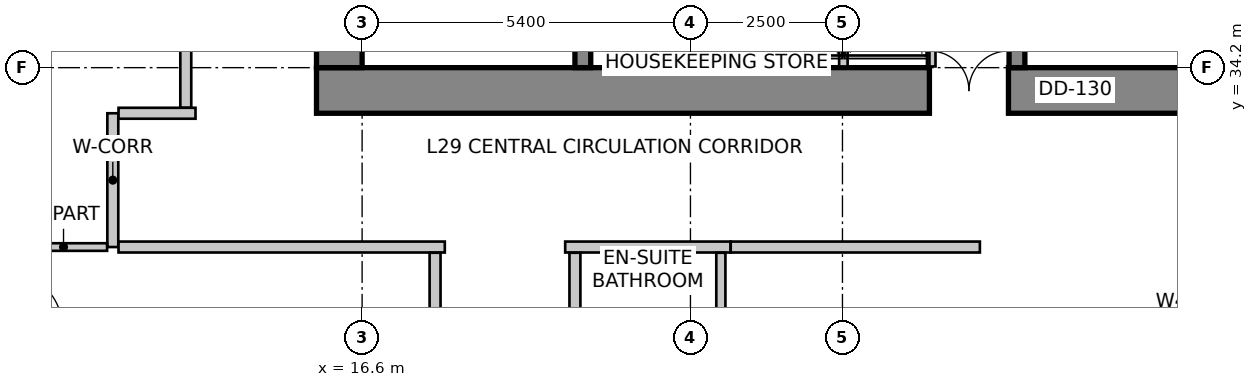
"""IFC4 building model, lengths in metres.
Left out: names, types, materials, properties, quantities, classifications, styles, units other than length and angle.
Written with IfcOpenShell. Run it as: python <this file> out.ifc"""

import sys

from ifc_helpers import new_model, si_unit, direction, frame, frame_2d, origin, place, context, subcontext, project, spatial, rectangle, extrude, source, transform, mapped, element, fill, save


model = new_model("IFC4")
c1 = context("Model", 3, precision=1e-05, world=origin(), true_north=direction((0.0, 1.0)))
c2 = subcontext(c1, "Body", "Model", "MODEL_VIEW")
j1 = project(units=[si_unit("LENGTHUNIT", "METRE"), si_unit("PLANEANGLEUNIT", "RADIAN")], contexts=[c1])
p1 = place(None, origin())
s1 = spatial("IfcSite", under=j1, at=p1, CompositionType="ELEMENT")
p2 = place(p1, origin())
s2 = spatial("IfcBuilding", under=s1, at=p2, CompositionType="ELEMENT")
p3 = place(p2, frame((0.0, 0.0, 121.4)))
s3 = spatial("IfcBuildingStorey", under=s2, at=p3, CompositionType="ELEMENT", Elevation=121.4)
p4 = place(p3, frame((15.85, 33.825, 0.0), z_axis=(0.0, 0.0, 1.0), x_axis=(1.0, 0.0, 0.0)))
e1 = element("IfcWall", 1, at=p4, inside=s3, PredefinedType="SHEAR", context=c2, shape_type="SweptSolid", body=[
    extrude(rectangle(XDim=15.9, YDim=0.75, at=frame_2d((7.95, 0.0))), origin(), (0.0, 0.0, 1.0), 3.6),
])
m1 = source(origin(), c2, "Body", "SweptSolid", [
    extrude(rectangle(XDim=1.3, YDim=2.15, at=frame_2d((0.65, 1.075))), frame((0.0, 0.385, 0.0), z_axis=(0.0, -1.0, 0.0), x_axis=(1.0, 0.0, 0.0)), (0.0, 0.0, 1.0), 0.77),
])
p5 = place(p4, frame((10.08, 0.0, 0.0)))
e2 = element("IfcOpeningElement", 2, at=p5, cuts=e1, PredefinedType="OPENING", context=c2, shape_type="MappedRepresentation", body=[
    mapped(m1, transform((0.0, 0.0, 0.0), scale=1.0)),
])
p6 = place(p3, frame((16.225, 34.2, 0.0), z_axis=(0.0, 0.0, 1.0), x_axis=(0.0, 1.0, 0.0)))
e3 = element("IfcWall", 3, at=p6, inside=s3, PredefinedType="SHEAR", context=c2, shape_type="SweptSolid", body=[
    extrude(rectangle(XDim=11.4, YDim=0.75, at=frame_2d((5.7, 0.0))), origin(), (0.0, 0.0, 1.0), 3.6),
])
m2 = source(origin(), c2, "Body", "SweptSolid", [
    extrude(rectangle(XDim=1.1, YDim=2.15, at=frame_2d((0.55, 1.075))), frame((0.0, 0.385, 0.0), z_axis=(0.0, -1.0, 0.0), x_axis=(1.0, 0.0, 0.0)), (0.0, 0.0, 1.0), 0.77),
])
p7 = place(p6, frame((7.15, 0.0, 0.0)))
e4 = element("IfcOpeningElement", 4, at=p7, cuts=e3, PredefinedType="OPENING", context=c2, shape_type="MappedRepresentation", body=[
    mapped(m2, transform((0.0, 0.0, 0.0), scale=1.0)),
])
p8 = place(p3, frame((20.23, 34.2, 0.0), z_axis=(0.0, 0.0, 1.0), x_axis=(0.0, 1.0, 0.0)))
e5 = element("IfcWall", 5, at=p8, inside=s3, PredefinedType="SHEAR", context=c2, shape_type="SweptSolid", body=[
    extrude(rectangle(XDim=9.06, YDim=0.26, at=frame_2d((4.53, 0.0))), origin(), (0.0, 0.0, 1.0), 3.6),
])
m3 = source(origin(), c2, "Body", "SweptSolid", [
    extrude(rectangle(XDim=1.1, YDim=2.15, at=frame_2d((0.55, 1.075))), frame((0.0, 0.14, 0.0), z_axis=(0.0, -1.0, 0.0), x_axis=(1.0, 0.0, 0.0)), (0.0, 0.0, 1.0), 0.28),
])
p9 = place(p8, frame((7.45, 0.0, 0.0)))
e6 = element("IfcOpeningElement", 6, at=p9, cuts=e5, PredefinedType="OPENING", context=c2, shape_type="MappedRepresentation", body=[
    mapped(m3, transform((0.0, 0.0, 0.0), scale=1.0)),
])
p10 = place(p3, frame((27.37, 34.2, 0.0), z_axis=(0.0, 0.0, 1.0), x_axis=(0.0, 1.0, 0.0)))
e7 = element("IfcWall", 7, at=p10, inside=s3, PredefinedType="SHEAR", context=c2, shape_type="SweptSolid", body=[
    extrude(rectangle(XDim=9.06, YDim=0.26, at=frame_2d((4.53, 0.0))), origin(), (0.0, 0.0, 1.0), 3.6),
])
p11 = place(p10, frame((7.45, 0.0, 0.0)))
e8 = element("IfcOpeningElement", 8, at=p11, cuts=e7, PredefinedType="OPENING", context=c2, shape_type="MappedRepresentation", body=[
    mapped(m3, transform((0.0, 0.0, 0.0), scale=1.0)),
])
p12 = place(p3, frame((28.884, 28.792, 0.0), z_axis=(0.0, 0.0, 1.0), x_axis=(0.707064797706, 0.707148762175, 0.0)))
e9 = element("IfcWall", 9, at=p12, inside=s3, PredefinedType="SOLIDWALL", context=c2, shape_type="SweptSolid", body=[
    extrude(rectangle(XDim=2.908, YDim=0.3, at=frame_2d((1.454, 0.0))), origin(), (0.0, 0.0, 1.0), 3.35),
])
m4 = source(origin(), c2, "Body", "SweptSolid", [
    extrude(rectangle(XDim=2.1, YDim=2.0, at=frame_2d((1.05, 1.0))), frame((0.0, 0.16, 0.0), z_axis=(0.0, -1.0, 0.0), x_axis=(1.0, 0.0, 0.0)), (0.0, 0.0, 1.0), 0.32),
])
p13 = place(p12, frame((0.404, 0.0, 0.85)))
e10 = element("IfcOpeningElement", 10, at=p13, cuts=e9, PredefinedType="OPENING", context=c2, shape_type="MappedRepresentation", body=[
    mapped(m4, transform((0.0, 0.0, 0.0), scale=1.0)),
])
p14 = place(p3, frame((13.269, 47.134, 0.0), z_axis=(0.0, 0.0, 1.0), x_axis=(-0.319929596295, -0.947441319246, 0.0)))
e11 = element("IfcWall", 11, at=p14, inside=s3, PredefinedType="SOLIDWALL", context=c2, shape_type="SweptSolid", body=[
    extrude(rectangle(XDim=16.134, YDim=0.3, at=frame_2d((8.067, 0.0))), origin(), (0.0, 0.0, 1.0), 3.35),
])
p15 = place(p14, frame((2.426, 0.0, 0.85)))
e12 = element("IfcOpeningElement", 12, at=p15, cuts=e11, PredefinedType="OPENING", context=c2, shape_type="MappedRepresentation", body=[
    mapped(m4, transform((0.0, 0.0, 0.0), scale=1.0)),
])
m5 = source(origin(), c2, "Body", "SweptSolid", [
    extrude(rectangle(XDim=2.4, YDim=2.2, at=frame_2d((1.2, 1.1))), frame((0.0, 0.16, 0.0), z_axis=(0.0, -1.0, 0.0), x_axis=(1.0, 0.0, 0.0)), (0.0, 0.0, 1.0), 0.32),
])
p16 = place(p14, frame((7.211, 0.0, 0.85)))
e13 = element("IfcOpeningElement", 13, at=p16, cuts=e11, PredefinedType="OPENING", context=c2, shape_type="MappedRepresentation", body=[
    mapped(m5, transform((0.0, 0.0, 0.0), scale=1.0)),
])
p17 = place(p14, frame((12.297, 0.0, 0.85)))
e14 = element("IfcOpeningElement", 14, at=p17, cuts=e11, PredefinedType="OPENING", context=c2, shape_type="MappedRepresentation", body=[
    mapped(m4, transform((0.0, 0.0, 0.0), scale=1.0)),
])
p18 = place(p3, frame((8.185, 31.834, 0.0), z_axis=(0.0, 0.0, 1.0), x_axis=(0.189707113148, -0.981840725994, 0.0)))
e15 = element("IfcWall", 15, at=p18, inside=s3, PredefinedType="SOLIDWALL", context=c2, shape_type="SweptSolid", body=[
    extrude(rectangle(XDim=21.221, YDim=0.3, at=frame_2d((10.611, 0.0))), origin(), (0.0, 0.0, 1.0), 3.35),
])
m6 = source(origin(), c2, "Body", "SweptSolid", [
    extrude(rectangle(XDim=1.6, YDim=2.15, at=frame_2d((0.8, 1.075))), frame((0.0, 0.16, 0.0), z_axis=(0.0, -1.0, 0.0), x_axis=(1.0, 0.0, 0.0)), (0.0, 0.0, 1.0), 0.32),
])
p19 = place(p18, frame((10.441, 0.0, 0.0)))
e16 = element("IfcOpeningElement", 16, at=p19, cuts=e15, PredefinedType="OPENING", context=c2, shape_type="MappedRepresentation", body=[
    mapped(m6, transform((0.0, 0.0, 0.0), scale=1.0)),
])
m7 = source(origin(), c2, "Body", "SweptSolid", [
    extrude(rectangle(XDim=1.5, YDim=1.8, at=frame_2d((0.75, 0.9))), frame((0.0, 0.16, 0.0), z_axis=(0.0, -1.0, 0.0), x_axis=(1.0, 0.0, 0.0)), (0.0, 0.0, 1.0), 0.32),
])
p20 = place(p18, frame((0.977, 0.0, 0.85)))
e17 = element("IfcOpeningElement", 17, at=p20, cuts=e15, PredefinedType="OPENING", context=c2, shape_type="MappedRepresentation", body=[
    mapped(m7, transform((0.0, 0.0, 0.0), scale=1.0)),
])
p21 = place(p18, frame((4.219, 0.0, 0.85)))
e18 = element("IfcOpeningElement", 18, at=p21, cuts=e15, PredefinedType="OPENING", context=c2, shape_type="MappedRepresentation", body=[
    mapped(m5, transform((0.0, 0.0, 0.0), scale=1.0)),
])
p22 = place(p18, frame((8.259, 0.0, 0.85)))
e19 = element("IfcOpeningElement", 19, at=p22, cuts=e15, PredefinedType="OPENING", context=c2, shape_type="MappedRepresentation", body=[
    mapped(m7, transform((0.0, 0.0, 0.0), scale=1.0)),
])
p23 = place(p18, frame((12.842, 0.0, 0.85)))
e20 = element("IfcOpeningElement", 20, at=p23, cuts=e15, PredefinedType="OPENING", context=c2, shape_type="MappedRepresentation", body=[
    mapped(m7, transform((0.0, 0.0, 0.0), scale=1.0)),
])
p24 = place(p18, frame((16.661, 0.0, 0.85)))
e21 = element("IfcOpeningElement", 21, at=p24, cuts=e15, PredefinedType="OPENING", context=c2, shape_type="MappedRepresentation", body=[
    mapped(m5, transform((0.0, 0.0, 0.0), scale=1.0)),
])
for number, where, z_axis, x_axis in (
    (22, (25.96, 34.22, 0.0), (0.0, 0.0, 1.0), (0.0, 1.0, 0.0)),
    (23, (23.07, 34.22, 0.0), (0.0, 0.0, 1.0), (0.0, 1.0, 0.0)),
    (24, (24.515, 34.22, 0.0), (0.0, 0.0, 1.0), (0.0, 1.0, 0.0)),
):
    element("IfcWall", number, at=place(p3, frame(where, z_axis=z_axis, x_axis=x_axis)), inside=s3, PredefinedType="SOLIDWALL", context=c2, shape_type="SweptSolid", body=[
        extrude(rectangle(XDim=1.62, YDim=0.14, at=frame_2d((0.81, 0.0))), origin(), (0.0, 0.0, 1.0), 2.642),
    ])
p25 = place(p3, frame((12.5, 31.25, 0.0), z_axis=(0.0, 0.0, 1.0), x_axis=(0.0, 1.0, 0.0)))
e25 = element("IfcWall", 25, at=p25, inside=s3, PredefinedType="PARTITIONING", context=c2, shape_type="SweptSolid", body=[
    extrude(rectangle(XDim=2.2, YDim=0.18, at=frame_2d((1.1, 0.0))), origin(), (0.0, 0.0, 1.0), 3.034),
])
p26 = place(p3, frame((12.594, 33.45, 0.0), z_axis=(0.0, 0.0, 1.0), x_axis=(1.0, 0.0, 0.0)))
e26 = element("IfcWall", 26, at=p26, inside=s3, PredefinedType="PARTITIONING", context=c2, shape_type="SweptSolid", body=[
    extrude(rectangle(XDim=1.266, YDim=0.18, at=frame_2d((0.633, 0.0))), origin(), (0.0, 0.0, 1.0), 3.35),
])
p27 = place(p3, frame((17.96, 31.25, 0.0), z_axis=(0.0, 0.0, 1.0), x_axis=(-1.0, 0.0, 0.0)))
e27 = element("IfcWall", 27, at=p27, inside=s3, PredefinedType="PARTITIONING", context=c2, shape_type="SweptSolid", body=[
    extrude(rectangle(XDim=5.366, YDim=0.18, at=frame_2d((2.683, 0.0))), origin(), (0.0, 0.0, 1.0), 3.034),
])
p28 = place(p3, frame((22.66, 31.25, 0.0), z_axis=(0.0, 0.0, 1.0), x_axis=(-1.0, 0.0, 0.0)))
e28 = element("IfcWall", 28, at=p28, inside=s3, PredefinedType="PARTITIONING", context=c2, shape_type="SweptSolid", body=[
    extrude(rectangle(XDim=2.72, YDim=0.18, at=frame_2d((1.36, 0.0))), origin(), (0.0, 0.0, 1.0), 3.034),
])
p29 = place(p3, frame((26.76, 31.25, 0.0), z_axis=(0.0, 0.0, 1.0), x_axis=(-1.0, 0.0, 0.0)))
e29 = element("IfcWall", 29, at=p29, inside=s3, PredefinedType="PARTITIONING", context=c2, shape_type="SweptSolid", body=[
    extrude(rectangle(XDim=4.098, YDim=0.18, at=frame_2d((2.049, 0.0))), origin(), (0.0, 0.0, 1.0), 3.35),
])
p30 = place(p3, frame((13.7, 33.544, 0.0), z_axis=(0.0, 0.0, 1.0), x_axis=(0.0, 1.0, 0.0)))
e30 = element("IfcWall", 30, at=p30, inside=s3, PredefinedType="PARTITIONING", context=c2, shape_type="SweptSolid", body=[
    extrude(rectangle(XDim=13.86, YDim=0.18, at=frame_2d((6.93, 0.0))), origin(), (0.0, 0.0, 1.0), 2.492),
])
m8 = source(origin(), c2, "Body", "SweptSolid", [
    extrude(rectangle(XDim=0.9, YDim=2.15, at=frame_2d((0.45, 1.075))), frame((0.0, 0.1, 0.0), z_axis=(0.0, -1.0, 0.0), x_axis=(1.0, 0.0, 0.0)), (0.0, 0.0, 1.0), 0.2),
])
p31 = place(p30, frame((4.253, 0.0, 0.0)))
e31 = element("IfcOpeningElement", 31, at=p31, cuts=e30, PredefinedType="OPENING", context=c2, shape_type="MappedRepresentation", body=[
    mapped(m8, transform((0.0, 0.0, 0.0), scale=1.0)),
])
p32 = place(p3, frame((12.406, 31.25, 0.0), z_axis=(0.0, 0.0, 1.0), x_axis=(-1.0, 0.0, 0.0)))
e32 = element("IfcWall", 32, at=p32, inside=s3, PredefinedType="PARTITIONING", context=c2, shape_type="SweptSolid", body=[
    extrude(rectangle(XDim=1.433, YDim=0.125, at=frame_2d((0.717, 0.0))), origin(), (0.0, 0.0, 1.0), 2.492),
])
p33 = place(p3, frame((17.8, 24.162, 0.0), z_axis=(0.0, 0.0, 1.0), x_axis=(0.0, 1.0, 0.0)))
e33 = element("IfcWall", 33, at=p33, inside=s3, PredefinedType="PARTITIONING", context=c2, shape_type="SweptSolid", body=[
    extrude(rectangle(XDim=6.994, YDim=0.18, at=frame_2d((3.497, 0.0))), origin(), (0.0, 0.0, 1.0), 2.803),
])
p34 = place(p33, frame((3.047, 0.0, 0.0)))
e34 = element("IfcOpeningElement", 34, at=p34, cuts=e33, PredefinedType="OPENING", context=c2, shape_type="MappedRepresentation", body=[
    mapped(m8, transform((0.0, 0.0, 0.0), scale=1.0)),
])
p35 = place(p3, frame((20.1, 31.156, 0.0), z_axis=(0.0, 0.0, 1.0), x_axis=(0.0, -1.0, 0.0)))
e35 = element("IfcWall", 35, at=p35, inside=s3, PredefinedType="PARTITIONING", context=c2, shape_type="SweptSolid", body=[
    extrude(rectangle(XDim=2.266, YDim=0.18, at=frame_2d((1.133, 0.0))), origin(), (0.0, 0.0, 1.0), 3.034),
])
p36 = place(p3, frame((22.5, 31.156, 0.0), z_axis=(0.0, 0.0, 1.0), x_axis=(0.0, -1.0, 0.0)))
e36 = element("IfcWall", 36, at=p36, inside=s3, PredefinedType="PARTITIONING", context=c2, shape_type="SweptSolid", body=[
    extrude(rectangle(XDim=2.027, YDim=0.15, at=frame_2d((1.014, 0.0))), origin(), (0.0, 0.0, 1.0), 3.034),
])
m9 = source(origin(), c2, "Body", "SweptSolid", [
    extrude(rectangle(XDim=2.1, YDim=2.0, at=frame_2d((1.05, 1.0))), frame((0.0, -0.015, 0.0), z_axis=(0.0, -1.0, 0.0), x_axis=(1.0, 0.0, 0.0)), (0.0, 0.0, 1.0), 0.06),
])
p37 = place(p13, origin())
e37 = element("IfcWindow", 37, at=p37, inside=s3, PartitioningType="SINGLE_PANEL", PredefinedType="WINDOW", context=c2, shape_type="MappedRepresentation", body=[
    mapped(m9, transform((0.0, 0.0, 0.0), scale=1.0)),
])
fill(e10, e37)
m10 = source(origin(), c2, "Body", "SweptSolid", [
    extrude(rectangle(XDim=1.3, YDim=2.15, at=frame_2d((0.65, 1.075))), frame((0.0, 0.025, 0.0), z_axis=(0.0, -1.0, 0.0), x_axis=(1.0, 0.0, 0.0)), (0.0, 0.0, 1.0), 0.05),
])
p38 = place(p5, origin())
e38 = element("IfcDoor", 38, at=p38, inside=s3, OperationType="DOUBLE_DOOR_SINGLE_SWING", PredefinedType="DOOR", context=c2, shape_type="MappedRepresentation", body=[
    mapped(m10, transform((0.0, 0.0, 0.0), scale=1.0)),
])
fill(e2, e38)
save(model, sys.argv[1])
